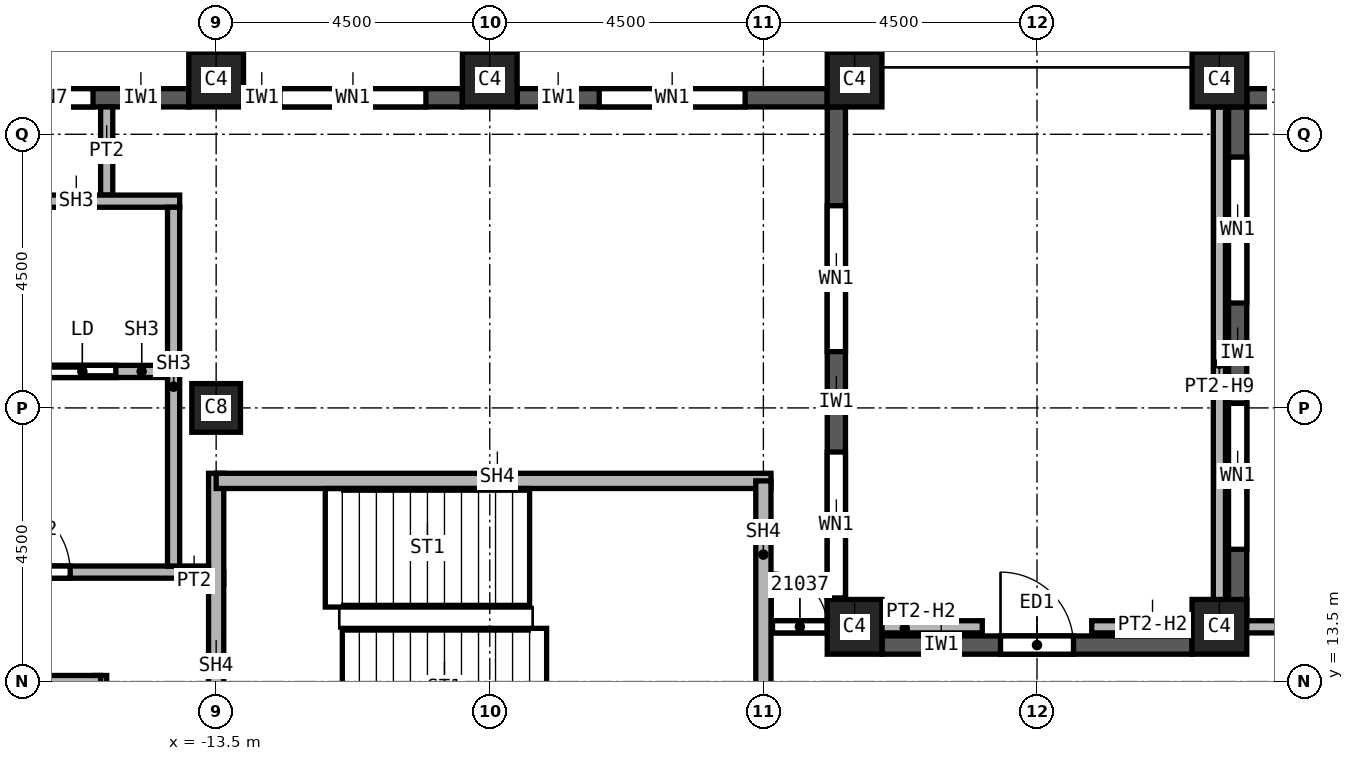
"""IFC4 building model, lengths in metres.
Left out: names, types, materials, properties, quantities, classifications, styles, units other than length and angle.
Written with IfcOpenShell. Run it as: python <this file> out.ifc"""

import sys

from ifc_helpers import new_model, si_unit, direction, frame, frame_2d, origin, origin_2d, place, context, subcontext, project, spatial, rectangle, extrude, element, fill, save


model = new_model("IFC4")
c1 = context("Model", 3, precision=1e-05, world=origin(), true_north=direction((0.0, 1.0)))
c2 = subcontext(c1, "Body", "Model", "MODEL_VIEW")
j1 = project(units=[si_unit("LENGTHUNIT", "METRE"), si_unit("PLANEANGLEUNIT", "RADIAN")], contexts=[c1])
p1 = place(None, origin())
s1 = spatial("IfcSite", under=j1, at=p1, CompositionType="ELEMENT")
p2 = place(p1, origin())
s2 = spatial("IfcBuilding", under=s1, at=p2, CompositionType="ELEMENT")
p3 = place(p2, frame((0.0, 0.0, 300.0)))
s3 = spatial("IfcBuildingStorey", under=s2, at=p3, CompositionType="ELEMENT", Elevation=300.0)
p4 = place(p3, frame((-13.5, 18.0, 0.0), z_axis=(0.0, 0.0, 1.0), x_axis=(1.0, 0.0, 0.0)))
e1 = element("IfcColumn", 1, at=p4, inside=s3, PredefinedType="COLUMN", context=c2, shape_type="SweptSolid", body=[
    extrude(rectangle(XDim=0.8, YDim=0.8, at=origin_2d()), origin(), (0.0, 0.0, 1.0), 3.74),
])
for number, where, z_axis, x_axis in (
    (2, (3.0, 23.4, 0.0), (0.0, 0.0, 1.0), (1.0, 0.0, 0.0)),
    (3, (-3.0, 23.4, 0.0), (0.0, 0.0, 1.0), (1.0, 0.0, 0.0)),
    (4, (-9.0, 23.4, 0.0), (0.0, 0.0, 1.0), (1.0, 0.0, 0.0)),
    (5, (-13.5, 23.4, 0.0), (0.0, 0.0, 1.0), (1.0, 0.0, 0.0)),
    (6, (3.0, 14.4, 0.0), (0.0, 0.0, 1.0), (1.0, 0.0, 0.0)),
    (7, (-3.0, 14.4, 0.0), (0.0, 0.0, 1.0), (1.0, 0.0, 0.0)),
):
    element("IfcColumn", number, at=place(p3, frame(where, z_axis=z_axis, x_axis=x_axis)), inside=s3, PredefinedType="COLUMN", context=c2, shape_type="SweptSolid", body=[
        extrude(rectangle(XDim=0.9, YDim=0.9, at=origin_2d()), origin(), (0.0, 0.0, 1.0), 3.74),
    ])
p5 = place(p3, frame((8.55, 23.1, 0.0), z_axis=(0.0, 0.0, 1.0), x_axis=(-1.0, 0.0, 0.0)))
e8 = element("IfcWall", 8, at=p5, inside=s3, PredefinedType="SOLIDWALL", context=c2, shape_type="SweptSolid", body=[
    extrude(rectangle(XDim=5.1, YDim=0.3, at=frame_2d((2.55, 0.0))), origin(), (0.0, 0.0, 1.0), 3.14),
])
p6 = place(p5, frame((1.35, 0.0, 0.8)))
e9 = element("IfcOpeningElement", 9, at=p6, cuts=e8, PredefinedType="OPENING", context=c2, shape_type="SweptSolid", body=[
    extrude(rectangle(XDim=2.4, YDim=1.95, at=frame_2d((1.2, 0.975))), frame((0.0, 0.15, 0.0), z_axis=(0.0, -1.0, 0.0), x_axis=(1.0, 0.0, 0.0)), (0.0, 0.0, 1.0), 0.3),
])
p7 = place(p3, frame((3.3, 22.95, 0.0), z_axis=(0.0, 0.0, 1.0), x_axis=(0.0, -1.0, 0.0)))
e10 = element("IfcWall", 10, at=p7, inside=s3, PredefinedType="SOLIDWALL", context=c2, shape_type="SweptSolid", body=[
    extrude(rectangle(XDim=8.5, YDim=0.3, at=frame_2d((4.25, 0.0))), origin(), (0.0, 0.0, 1.0), 3.14),
])
p8 = place(p7, frame((0.825, 0.0, 0.8)))
e11 = element("IfcOpeningElement", 11, at=p8, cuts=e10, PredefinedType="OPENING", context=c2, shape_type="SweptSolid", body=[
    extrude(rectangle(XDim=2.4, YDim=1.95, at=frame_2d((1.2, 0.975))), frame((0.0, 0.15, 0.0), z_axis=(0.0, -1.0, 0.0), x_axis=(1.0, 0.0, 0.0)), (0.0, 0.0, 1.0), 0.3),
])
p9 = place(p7, frame((4.875, 0.0, 0.8)))
e12 = element("IfcOpeningElement", 12, at=p9, cuts=e10, PredefinedType="OPENING", context=c2, shape_type="SweptSolid", body=[
    extrude(rectangle(XDim=2.4, YDim=1.95, at=frame_2d((1.2, 0.975))), frame((0.0, 0.15, 0.0), z_axis=(0.0, -1.0, 0.0), x_axis=(1.0, 0.0, 0.0)), (0.0, 0.0, 1.0), 0.3),
])
p10 = place(p3, frame((-2.55, 14.1, 0.0), z_axis=(0.0, 0.0, 1.0), x_axis=(1.0, 0.0, 0.0)))
e13 = element("IfcWall", 13, at=p10, inside=s3, PredefinedType="SOLIDWALL", context=c2, shape_type="SweptSolid", body=[
    extrude(rectangle(XDim=5.1, YDim=0.3, at=frame_2d((2.55, 0.0))), origin(), (0.0, 0.0, 1.0), 3.14),
])
p11 = place(p10, frame((1.95, 0.0, 0.0)))
e14 = element("IfcOpeningElement", 14, at=p11, cuts=e13, PredefinedType="OPENING", context=c2, shape_type="SweptSolid", body=[
    extrude(rectangle(XDim=1.2, YDim=2.4, at=frame_2d((0.6, 1.2))), frame((0.0, 0.15, 0.0), z_axis=(0.0, -1.0, 0.0), x_axis=(1.0, 0.0, 0.0)), (0.0, 0.0, 1.0), 0.3),
])
p12 = place(p3, frame((-3.3, 14.45, 0.0), z_axis=(0.0, 0.0, 1.0), x_axis=(0.0, 1.0, 0.0)))
e15 = element("IfcWall", 15, at=p12, inside=s3, PredefinedType="SOLIDWALL", context=c2, shape_type="SweptSolid", body=[
    extrude(rectangle(XDim=8.5, YDim=0.3, at=frame_2d((4.25, 0.0))), origin(), (0.0, 0.0, 1.0), 3.14),
])
p13 = place(p12, frame((0.425, 0.0, 0.8)))
e16 = element("IfcOpeningElement", 16, at=p13, cuts=e15, PredefinedType="OPENING", context=c2, shape_type="SweptSolid", body=[
    extrude(rectangle(XDim=2.4, YDim=1.95, at=frame_2d((1.2, 0.975))), frame((0.0, 0.15, 0.0), z_axis=(0.0, -1.0, 0.0), x_axis=(1.0, 0.0, 0.0)), (0.0, 0.0, 1.0), 0.3),
])
p14 = place(p12, frame((4.475, 0.0, 0.8)))
e17 = element("IfcOpeningElement", 17, at=p14, cuts=e15, PredefinedType="OPENING", context=c2, shape_type="SweptSolid", body=[
    extrude(rectangle(XDim=2.4, YDim=1.95, at=frame_2d((1.2, 0.975))), frame((0.0, 0.15, 0.0), z_axis=(0.0, -1.0, 0.0), x_axis=(1.0, 0.0, 0.0)), (0.0, 0.0, 1.0), 0.3),
])
p15 = place(p3, frame((-3.45, 23.1, 0.0), z_axis=(0.0, 0.0, 1.0), x_axis=(-1.0, 0.0, 0.0)))
e18 = element("IfcWall", 18, at=p15, inside=s3, PredefinedType="SOLIDWALL", context=c2, shape_type="SweptSolid", body=[
    extrude(rectangle(XDim=5.1, YDim=0.3, at=frame_2d((2.55, 0.0))), origin(), (0.0, 0.0, 1.0), 3.14),
])
p16 = place(p15, frame((1.35, 0.0, 0.8)))
e19 = element("IfcOpeningElement", 19, at=p16, cuts=e18, PredefinedType="OPENING", context=c2, shape_type="SweptSolid", body=[
    extrude(rectangle(XDim=2.4, YDim=1.95, at=frame_2d((1.2, 0.975))), frame((0.0, 0.15, 0.0), z_axis=(0.0, -1.0, 0.0), x_axis=(1.0, 0.0, 0.0)), (0.0, 0.0, 1.0), 0.3),
])
p17 = place(p3, frame((-9.45, 23.1, 0.0), z_axis=(0.0, 0.0, 1.0), x_axis=(-1.0, 0.0, 0.0)))
e20 = element("IfcWall", 20, at=p17, inside=s3, PredefinedType="SOLIDWALL", context=c2, shape_type="SweptSolid", body=[
    extrude(rectangle(XDim=3.6, YDim=0.3, at=frame_2d((1.8, 0.0))), origin(), (0.0, 0.0, 1.0), 3.14),
])
p18 = place(p17, frame((0.6, 0.0, 0.8)))
e21 = element("IfcOpeningElement", 21, at=p18, cuts=e20, PredefinedType="OPENING", context=c2, shape_type="SweptSolid", body=[
    extrude(rectangle(XDim=2.4, YDim=1.95, at=frame_2d((1.2, 0.975))), frame((0.0, 0.15, 0.0), z_axis=(0.0, -1.0, 0.0), x_axis=(1.0, 0.0, 0.0)), (0.0, 0.0, 1.0), 0.3),
])
p19 = place(p3, frame((-13.95, 23.1, 0.0), z_axis=(0.0, 0.0, 1.0), x_axis=(-1.0, 0.0, 0.0)))
e22 = element("IfcWall", 22, at=p19, inside=s3, PredefinedType="SOLIDWALL", context=c2, shape_type="SweptSolid", body=[
    extrude(rectangle(XDim=3.6, YDim=0.3, at=frame_2d((1.8, 0.0))), origin(), (0.0, 0.0, 1.0), 3.14),
])
p20 = place(p19, frame((1.575, 0.0, 0.8)))
e23 = element("IfcOpeningElement", 23, at=p20, cuts=e22, PredefinedType="OPENING", context=c2, shape_type="SweptSolid", body=[
    extrude(rectangle(XDim=1.4, YDim=1.95, at=frame_2d((0.7, 0.975))), frame((0.0, 0.15, 0.0), z_axis=(0.0, -1.0, 0.0), x_axis=(1.0, 0.0, 0.0)), (0.0, 0.0, 1.0), 0.3),
])
p21 = place(p3, frame((-15.4, -22.95, 0.0), z_axis=(0.0, 0.0, 1.0), x_axis=(0.0, 1.0, 0.0)))
e24 = element("IfcWall", 24, at=p21, inside=s3, PredefinedType="PARTITIONING", context=c2, shape_type="SweptSolid", body=[
    extrude(rectangle(XDim=36.55, YDim=0.2, at=frame_2d((18.275, 0.0))), origin(), (0.0, 0.0, 1.0), 3.74),
])
p22 = place(p21, frame((23.1, 0.0, 0.0)))
e25 = element("IfcOpeningElement", 25, at=p22, cuts=e24, PredefinedType="OPENING", context=c2, shape_type="SweptSolid", body=[
    extrude(rectangle(XDim=1.0, YDim=2.1, at=frame_2d((0.5, 1.05))), frame((0.0, 0.1, 0.0), z_axis=(0.0, -1.0, 0.0), x_axis=(1.0, 0.0, 0.0)), (0.0, 0.0, 1.0), 0.2),
])
p23 = place(p21, frame((34.35, 0.0, 0.0)))
e26 = element("IfcOpeningElement", 26, at=p23, cuts=e24, PredefinedType="OPENING", context=c2, shape_type="SweptSolid", body=[
    extrude(rectangle(XDim=1.0, YDim=2.1, at=frame_2d((0.5, 1.05))), frame((0.0, 0.1, 0.0), z_axis=(0.0, -1.0, 0.0), x_axis=(1.0, 0.0, 0.0)), (0.0, 0.0, 1.0), 0.2),
])
p24 = place(p21, frame((2.95, 0.0, 0.0)))
e27 = element("IfcOpeningElement", 27, at=p24, cuts=e24, PredefinedType="OPENING", context=c2, shape_type="SweptSolid", body=[
    extrude(rectangle(XDim=1.0, YDim=2.1, at=frame_2d((0.5, 1.05))), frame((0.0, 0.1, 0.0), z_axis=(0.0, -1.0, 0.0), x_axis=(1.0, 0.0, 0.0)), (0.0, 0.0, 1.0), 0.2),
])
p25 = place(p21, frame((6.15, 0.0, 0.0)))
e28 = element("IfcOpeningElement", 28, at=p25, cuts=e24, PredefinedType="OPENING", context=c2, shape_type="SweptSolid", body=[
    extrude(rectangle(XDim=1.0, YDim=2.1, at=frame_2d((0.5, 1.05))), frame((0.0, 0.1, 0.0), z_axis=(0.0, -1.0, 0.0), x_axis=(1.0, 0.0, 0.0)), (0.0, 0.0, 1.0), 0.2),
])
p26 = place(p21, frame((8.625, 0.0, 0.0)))
e29 = element("IfcOpeningElement", 29, at=p26, cuts=e24, PredefinedType="OPENING", context=c2, shape_type="SweptSolid", body=[
    extrude(rectangle(XDim=1.0, YDim=2.1, at=frame_2d((0.5, 1.05))), frame((0.0, 0.1, 0.0), z_axis=(0.0, -1.0, 0.0), x_axis=(1.0, 0.0, 0.0)), (0.0, 0.0, 1.0), 0.2),
])
p27 = place(p21, frame((15.0, 0.0, 0.0)))
e30 = element("IfcOpeningElement", 30, at=p27, cuts=e24, PredefinedType="OPENING", context=c2, shape_type="SweptSolid", body=[
    extrude(rectangle(XDim=1.0, YDim=2.1, at=frame_2d((0.5, 1.05))), frame((0.0, 0.1, 0.0), z_axis=(0.0, -1.0, 0.0), x_axis=(1.0, 0.0, 0.0)), (0.0, 0.0, 1.0), 0.2),
])
p28 = place(p3, frame((-15.4, 13.5, 0.0), z_axis=(0.0, 0.0, 1.0), x_axis=(-1.0, 0.0, 0.0)))
e31 = element("IfcWall", 31, at=p28, inside=s3, PredefinedType="PARTITIONING", context=c2, shape_type="SweptSolid", body=[
    extrude(rectangle(XDim=6.8, YDim=0.2, at=frame_2d((3.4, 0.0))), origin(), (0.0, 0.0, 1.0), 3.74),
])
p29 = place(p3, frame((-15.3, 22.95, 0.0), z_axis=(0.0, 0.0, 1.0), x_axis=(0.0, -1.0, 0.0)))
e32 = element("IfcWall", 32, at=p29, inside=s3, PredefinedType="PARTITIONING", context=c2, shape_type="SweptSolid", body=[
    extrude(rectangle(XDim=1.45, YDim=0.2, at=frame_2d((0.725, 0.0))), origin(), (0.0, 0.0, 1.0), 3.74),
])
p30 = place(p3, frame((-14.1, 15.2, 0.0), z_axis=(0.0, 0.0, 1.0), x_axis=(1.0, 0.0, 0.0)))
e33 = element("IfcWall", 33, at=p30, inside=s3, PredefinedType="PARTITIONING", context=c2, shape_type="SweptSolid", body=[
    extrude(rectangle(XDim=0.725, YDim=0.2, at=frame_2d((0.363, 0.0))), origin(), (0.0, 0.0, 1.0), 3.74),
])
p31 = place(p3, frame((-4.5, 14.4, 0.0), z_axis=(0.0, 0.0, 1.0), x_axis=(1.0, 0.0, 0.0)))
e34 = element("IfcWall", 34, at=p31, inside=s3, PredefinedType="PARTITIONING", context=c2, shape_type="SweptSolid", body=[
    extrude(rectangle(XDim=3.6, YDim=0.2, at=frame_2d((1.8, 0.0))), origin(), (0.0, 0.0, 1.0), 3.207),
])
p32 = place(p31, frame((0.15, 0.0, 0.0)))
e35 = element("IfcOpeningElement", 35, at=p32, cuts=e34, PredefinedType="OPENING", context=c2, shape_type="SweptSolid", body=[
    extrude(rectangle(XDim=0.9, YDim=2.1, at=frame_2d((0.45, 1.05))), frame((0.0, 0.1, 0.0), z_axis=(0.0, -1.0, 0.0), x_axis=(1.0, 0.0, 0.0)), (0.0, 0.0, 1.0), 0.2),
])
p33 = place(p3, frame((0.9, 14.4, 0.0), z_axis=(0.0, 0.0, 1.0), x_axis=(1.0, 0.0, 0.0)))
e36 = element("IfcWall", 36, at=p33, inside=s3, PredefinedType="PARTITIONING", context=c2, shape_type="SweptSolid", body=[
    extrude(rectangle(XDim=3.6, YDim=0.2, at=frame_2d((1.8, 0.0))), origin(), (0.0, 0.0, 1.0), 3.207),
])
p34 = place(p3, frame((3.0, 22.95, 0.0), z_axis=(0.0, 0.0, 1.0), x_axis=(0.0, -1.0, 0.0)))
e37 = element("IfcWall", 37, at=p34, inside=s3, PredefinedType="PARTITIONING", context=c2, shape_type="SweptSolid", body=[
    extrude(rectangle(XDim=8.55, YDim=0.2, at=frame_2d((4.275, 0.0))), origin(), (0.0, 0.0, 1.0), 2.894),
])
p35 = place(p3, frame((-13.5, 12.175, 0.0), z_axis=(0.0, 0.0, 1.0), x_axis=(0.0, 1.0, 0.0)))
e38 = element("IfcWall", 38, at=p35, inside=s3, PredefinedType="SOLIDWALL", context=c2, shape_type="SweptSolid", body=[
    extrude(rectangle(XDim=4.75, YDim=0.25, at=frame_2d((2.375, 0.0))), origin(), (0.0, 0.0, 1.0), 3.74),
])
p36 = place(p3, frame((-13.5, 16.8, 0.0), z_axis=(0.0, 0.0, 1.0), x_axis=(1.0, 0.0, 0.0)))
e39 = element("IfcWall", 39, at=p36, inside=s3, PredefinedType="SOLIDWALL", context=c2, shape_type="SweptSolid", body=[
    extrude(rectangle(XDim=9.125, YDim=0.25, at=frame_2d((4.562, 0.0))), origin(), (0.0, 0.0, 1.0), 3.74),
])
p37 = place(p3, frame((-4.5, 16.8, 0.0), z_axis=(0.0, 0.0, 1.0), x_axis=(0.0, -1.0, 0.0)))
e40 = element("IfcWall", 40, at=p37, inside=s3, PredefinedType="SOLIDWALL", context=c2, shape_type="SweptSolid", body=[
    extrude(rectangle(XDim=4.5, YDim=0.25, at=frame_2d((2.25, 0.0))), origin(), (0.0, 0.0, 1.0), 3.74),
])
p38 = place(p3, frame((-21.9, 15.3, 0.0), z_axis=(0.0, 0.0, 1.0), x_axis=(1.0, 0.0, 0.0)))
e41 = element("IfcWall", 41, at=p38, inside=s3, PredefinedType="SOLIDWALL", context=c2, shape_type="SweptSolid", body=[
    extrude(rectangle(XDim=8.275, YDim=0.2, at=frame_2d((4.137, 0.0))), origin(), (0.0, 0.0, 1.0), 3.74),
])
p39 = place(p38, frame((4.8, 0.0, 0.0)))
e42 = element("IfcOpeningElement", 42, at=p39, cuts=e41, PredefinedType="OPENING", context=c2, shape_type="SweptSolid", body=[
    extrude(rectangle(XDim=1.2, YDim=2.1, at=frame_2d((0.6, 1.05))), frame((0.0, 0.1, 0.0), z_axis=(0.0, -1.0, 0.0), x_axis=(1.0, 0.0, 0.0)), (0.0, 0.0, 1.0), 0.2),
])
p40 = place(p3, frame((-21.9, 21.4, 0.0), z_axis=(0.0, 0.0, 1.0), x_axis=(1.0, 0.0, 0.0)))
e43 = element("IfcWall", 43, at=p40, inside=s3, PredefinedType="SOLIDWALL", context=c2, shape_type="SweptSolid", body=[
    extrude(rectangle(XDim=7.8, YDim=0.2, at=frame_2d((3.9, 0.0))), origin(), (0.0, 0.0, 1.0), 3.74),
])
p41 = place(p40, frame((3.2, 0.0, 0.0)))
e44 = element("IfcOpeningElement", 44, at=p41, cuts=e43, PredefinedType="OPENING", context=c2, shape_type="SweptSolid", body=[
    extrude(rectangle(XDim=1.2, YDim=2.1, at=frame_2d((0.6, 1.05))), frame((0.0, 0.1, 0.0), z_axis=(0.0, -1.0, 0.0), x_axis=(1.0, 0.0, 0.0)), (0.0, 0.0, 1.0), 0.2),
])
p42 = place(p3, frame((-14.2, 15.4, 0.0), z_axis=(0.0, 0.0, 1.0), x_axis=(0.0, 1.0, 0.0)))
e45 = element("IfcWall", 45, at=p42, inside=s3, PredefinedType="SOLIDWALL", context=c2, shape_type="SweptSolid", body=[
    extrude(rectangle(XDim=5.9, YDim=0.2, at=frame_2d((2.95, 0.0))), origin(), (0.0, 0.0, 1.0), 3.74),
])
p43 = place(p3, frame((-17.1, 18.6, 0.0), z_axis=(0.0, 0.0, 1.0), x_axis=(1.0, 0.0, 0.0)))
e46 = element("IfcWall", 46, at=p43, inside=s3, PredefinedType="SOLIDWALL", context=c2, shape_type="SweptSolid", body=[
    extrude(rectangle(XDim=2.8, YDim=0.2, at=frame_2d((1.4, 0.0))), origin(), (0.0, 0.0, 1.0), 3.74),
])
p44 = place(p43, frame((0.85, 0.0, 0.0)))
e47 = element("IfcOpeningElement", 47, at=p44, cuts=e46, PredefinedType="OPENING", context=c2, shape_type="SweptSolid", body=[
    extrude(rectangle(XDim=1.1, YDim=2.1, at=frame_2d((0.55, 1.05))), frame((0.0, 0.1, 0.0), z_axis=(0.0, -1.0, 0.0), x_axis=(1.0, 0.0, 0.0)), (0.0, 0.0, 1.0), 0.2),
])
p45 = place(p8, origin())
e48 = element("IfcWindow", 48, at=p45, inside=s3, PartitioningType="SINGLE_PANEL", PredefinedType="WINDOW", context=c2, shape_type="SweptSolid", body=[
    extrude(rectangle(XDim=2.4, YDim=1.95, at=frame_2d((1.2, 0.975))), frame((0.0, 0.03, 0.0), z_axis=(0.0, -1.0, 0.0), x_axis=(1.0, 0.0, 0.0)), (0.0, 0.0, 1.0), 0.06),
])
fill(e11, e48)
p46 = place(p9, origin())
e49 = element("IfcWindow", 49, at=p46, inside=s3, PartitioningType="SINGLE_PANEL", PredefinedType="WINDOW", context=c2, shape_type="SweptSolid", body=[
    extrude(rectangle(XDim=2.4, YDim=1.95, at=frame_2d((1.2, 0.975))), frame((0.0, 0.03, 0.0), z_axis=(0.0, -1.0, 0.0), x_axis=(1.0, 0.0, 0.0)), (0.0, 0.0, 1.0), 0.06),
])
fill(e12, e49)
p47 = place(p11, origin())
e50 = element("IfcDoor", 50, at=p47, inside=s3, OperationType="SINGLE_SWING_LEFT", PredefinedType="DOOR", context=c2, shape_type="SweptSolid", body=[
    extrude(rectangle(XDim=1.2, YDim=2.4, at=frame_2d((0.6, 1.2))), frame((0.0, 0.025, 0.0), z_axis=(0.0, -1.0, 0.0), x_axis=(1.0, 0.0, 0.0)), (0.0, 0.0, 1.0), 0.05),
])
fill(e14, e50)
p48 = place(p13, origin())
e51 = element("IfcWindow", 51, at=p48, inside=s3, PartitioningType="SINGLE_PANEL", PredefinedType="WINDOW", context=c2, shape_type="SweptSolid", body=[
    extrude(rectangle(XDim=2.4, YDim=1.95, at=frame_2d((1.2, 0.975))), frame((0.0, 0.03, 0.0), z_axis=(0.0, -1.0, 0.0), x_axis=(1.0, 0.0, 0.0)), (0.0, 0.0, 1.0), 0.06),
])
fill(e16, e51)
p49 = place(p14, origin())
e52 = element("IfcWindow", 52, at=p49, inside=s3, PartitioningType="SINGLE_PANEL", PredefinedType="WINDOW", context=c2, shape_type="SweptSolid", body=[
    extrude(rectangle(XDim=2.4, YDim=1.95, at=frame_2d((1.2, 0.975))), frame((0.0, 0.03, 0.0), z_axis=(0.0, -1.0, 0.0), x_axis=(1.0, 0.0, 0.0)), (0.0, 0.0, 1.0), 0.06),
])
fill(e17, e52)
p50 = place(p16, origin())
e53 = element("IfcWindow", 53, at=p50, inside=s3, PartitioningType="SINGLE_PANEL", PredefinedType="WINDOW", context=c2, shape_type="SweptSolid", body=[
    extrude(rectangle(XDim=2.4, YDim=1.95, at=frame_2d((1.2, 0.975))), frame((0.0, 0.03, 0.0), z_axis=(0.0, -1.0, 0.0), x_axis=(1.0, 0.0, 0.0)), (0.0, 0.0, 1.0), 0.06),
])
fill(e19, e53)
p51 = place(p18, origin())
e54 = element("IfcWindow", 54, at=p51, inside=s3, PartitioningType="SINGLE_PANEL", PredefinedType="WINDOW", context=c2, shape_type="SweptSolid", body=[
    extrude(rectangle(XDim=2.4, YDim=1.95, at=frame_2d((1.2, 0.975))), frame((0.0, 0.03, 0.0), z_axis=(0.0, -1.0, 0.0), x_axis=(1.0, 0.0, 0.0)), (0.0, 0.0, 1.0), 0.06),
])
fill(e21, e54)
p52 = place(p32, origin())
e55 = element("IfcDoor", 55, at=p52, inside=s3, OperationType="SINGLE_SWING_LEFT", PredefinedType="DOOR", context=c2, shape_type="SweptSolid", body=[
    extrude(rectangle(XDim=0.9, YDim=2.1, at=frame_2d((0.45, 1.05))), frame((0.0, 0.025, 0.0), z_axis=(0.0, -1.0, 0.0), x_axis=(1.0, 0.0, 0.0)), (0.0, 0.0, 1.0), 0.05),
])
fill(e35, e55)
p53 = place(p44, origin())
e56 = element("IfcDoor", 56, at=p53, inside=s3, OperationType="SLIDING_TO_LEFT", PredefinedType="DOOR", context=c2, shape_type="SweptSolid", body=[
    extrude(rectangle(XDim=1.1, YDim=2.1, at=frame_2d((0.55, 1.05))), frame((0.0, 0.025, 0.0), z_axis=(0.0, -1.0, 0.0), x_axis=(1.0, 0.0, 0.0)), (0.0, 0.0, 1.0), 0.05),
])
fill(e47, e56)
p54 = place(p39, origin())
e57 = element("IfcDoor", 57, at=p54, inside=s3, OperationType="SINGLE_SWING_RIGHT", PredefinedType="DOOR", context=c2, shape_type="SweptSolid", body=[
    extrude(rectangle(XDim=1.2, YDim=2.1, at=frame_2d((0.6, 1.05))), frame((0.0, 0.025, 0.0), z_axis=(0.0, -1.0, 0.0), x_axis=(1.0, 0.0, 0.0)), (0.0, 0.0, 1.0), 0.05),
])
fill(e42, e57)
p55 = place(p20, origin())
e58 = element("IfcWindow", 58, at=p55, inside=s3, PartitioningType="SINGLE_PANEL", PredefinedType="WINDOW", context=c2, shape_type="SweptSolid", body=[
    extrude(rectangle(XDim=1.4, YDim=1.95, at=frame_2d((0.7, 0.975))), frame((0.0, 0.03, 0.0), z_axis=(0.0, -1.0, 0.0), x_axis=(1.0, 0.0, 0.0)), (0.0, 0.0, 1.0), 0.06),
])
fill(e23, e58)
save(model, sys.argv[1])
